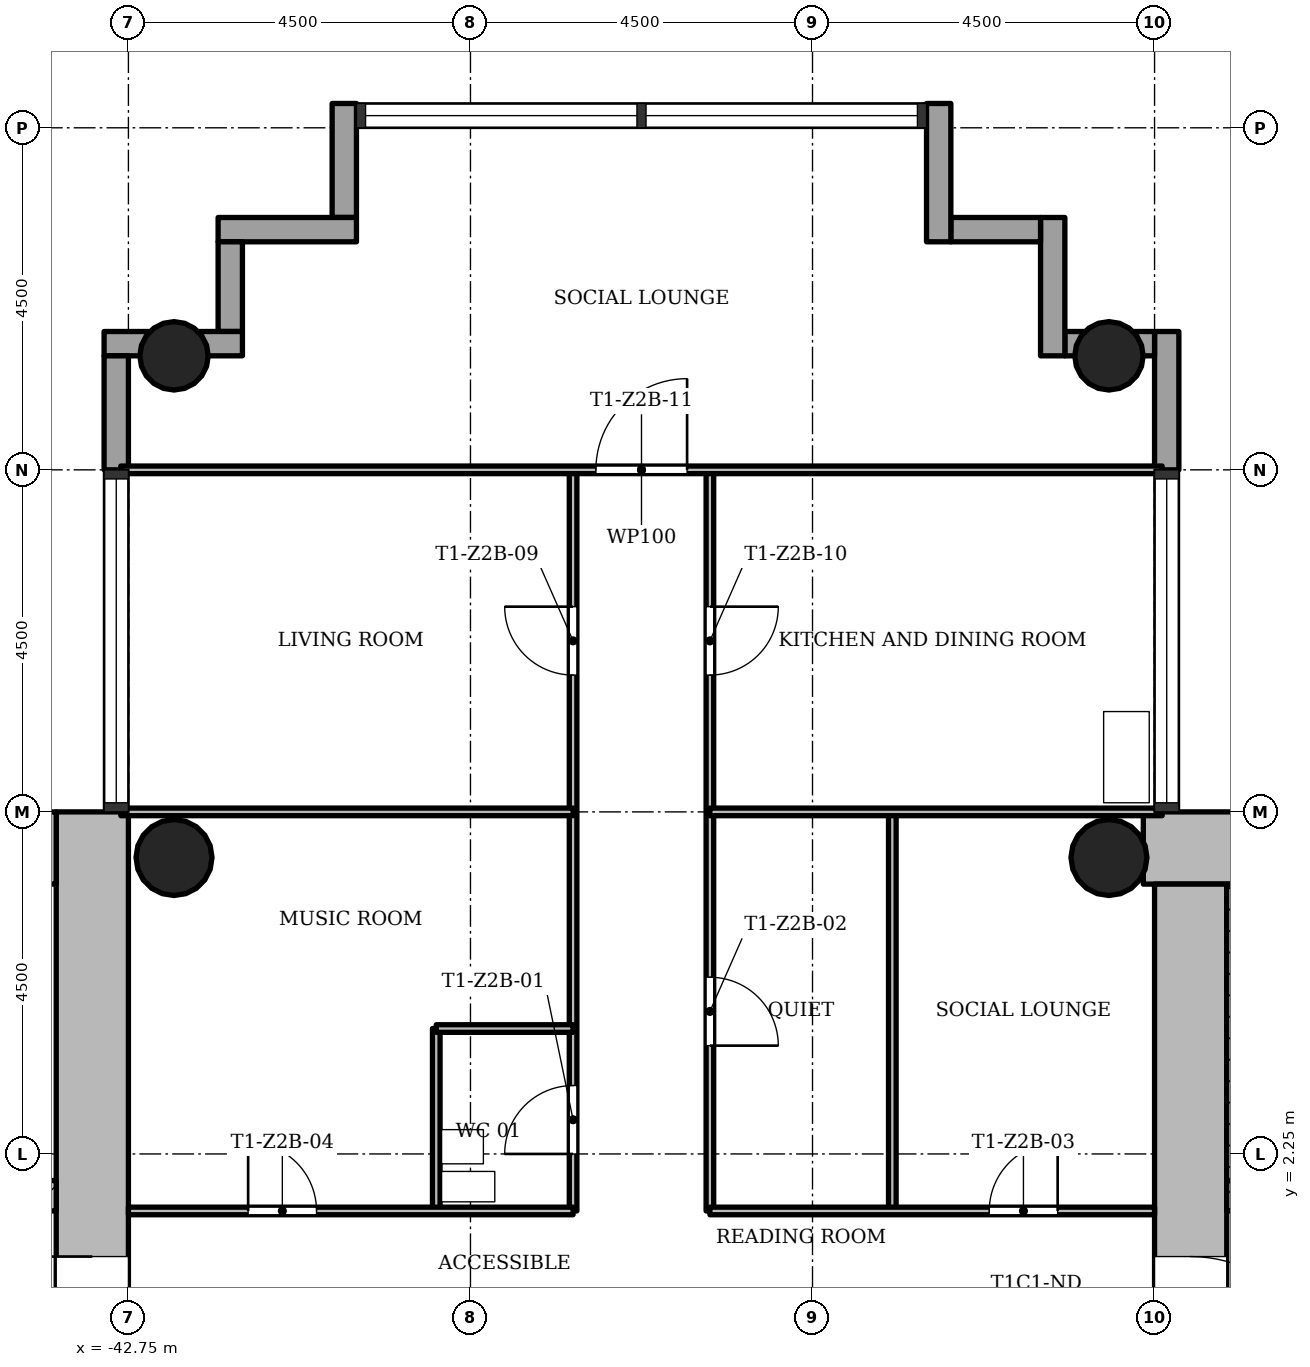
"""IFC4 building model, lengths in metres.
Left out: names, types, materials, properties, quantities, classifications, styles, units other than length and angle.
Written with IfcOpenShell. Run it as: python <this file> out.ifc"""

import sys

from ifc_helpers import new_model, si_unit, direction, frame, frame_2d, origin, origin_2d, place, context, subcontext, project, spatial, rectangle, hollow_circle, extrude, element, fill, save


model = new_model("IFC4")
c1 = context("Model", 3, precision=1e-05, world=origin(), true_north=direction((0.0, 1.0)))
c2 = subcontext(c1, "Body", "Model", "MODEL_VIEW")
j1 = project(units=[si_unit("LENGTHUNIT", "METRE"), si_unit("PLANEANGLEUNIT", "RADIAN")], contexts=[c1])
p1 = place(None, origin())
s1 = spatial("IfcSite", under=j1, at=p1, CompositionType="ELEMENT")
p2 = place(p1, origin())
s2 = spatial("IfcBuilding", under=s1, at=p2, CompositionType="ELEMENT")
p3 = place(p2, frame((0.0, 0.0, 80.0)))
s3 = spatial("IfcBuildingStorey", under=s2, at=p3, CompositionType="ELEMENT", Elevation=80.0)
p4 = place(p3, frame((-20.702, 6.275, 0.0), z_axis=(0.0, 0.0, 1.0), x_axis=(-1.0, 0.0, 0.0)))
e1 = element("IfcWall", 1, at=p4, inside=s3, PredefinedType="SHEAR", context=c2, shape_type="SweptSolid", body=[
    extrude(rectangle(XDim=8.696, YDim=0.95, at=frame_2d((4.348, 0.0))), origin(), (0.0, 0.0, 1.0), 3.4),
])
p5 = place(p3, frame((-28.775, 5.8, 0.0), z_axis=(0.0, 0.0, 1.0), x_axis=(0.0, -1.0, 0.0)))
e2 = element("IfcWall", 2, at=p5, inside=s3, PredefinedType="SHEAR", context=c2, shape_type="SweptSolid", body=[
    extrude(rectangle(XDim=12.55, YDim=0.95, at=frame_2d((6.275, 0.0))), origin(), (0.0, 0.0, 1.0), 3.4),
])
p6 = place(p5, frame((4.9, 0.0, 0.0)))
e3 = element("IfcOpeningElement", 3, at=p6, cuts=e2, PredefinedType="OPENING", context=c2, shape_type="SweptSolid", body=[
    extrude(rectangle(XDim=1.8, YDim=2.1, at=frame_2d((0.9, 1.05))), frame((0.0, 0.485, 0.0), z_axis=(0.0, -1.0, 0.0), x_axis=(1.0, 0.0, 0.0)), (0.0, 0.0, 1.0), 0.97),
])
p7 = place(p3, frame((-28.3, 1.7, 0.0), z_axis=(0.0, 0.0, 1.0), x_axis=(1.0, 0.0, 0.0)))
e4 = element("IfcWall", 4, at=p7, inside=s3, PredefinedType="SHEAR", context=c2, shape_type="SweptSolid", body=[
    extrude(rectangle(XDim=7.1, YDim=0.4, at=frame_2d((3.55, 0.0))), origin(), (0.0, 0.0, 1.0), 3.4),
])
p8 = place(p7, frame((0.7, 0.0, 0.0)))
e5 = element("IfcOpeningElement", 5, at=p8, cuts=e4, PredefinedType="OPENING", context=c2, shape_type="SweptSolid", body=[
    extrude(rectangle(XDim=0.9, YDim=2.1, at=frame_2d((0.45, 1.05))), frame((0.0, 0.21, 0.0), z_axis=(0.0, -1.0, 0.0), x_axis=(1.0, 0.0, 0.0)), (0.0, 0.0, 1.0), 0.42),
])
p9 = place(p3, frame((-43.225, -5.8, 0.0), z_axis=(0.0, 0.0, 1.0), x_axis=(0.0, 1.0, 0.0)))
e6 = element("IfcWall", 6, at=p9, inside=s3, PredefinedType="SHEAR", context=c2, shape_type="SweptSolid", body=[
    extrude(rectangle(XDim=12.55, YDim=0.95, at=frame_2d((6.275, 0.0))), origin(), (0.0, 0.0, 1.0), 3.4),
])
p10 = place(p9, frame((4.9, 0.0, 0.0)))
e7 = element("IfcOpeningElement", 7, at=p10, cuts=e6, PredefinedType="OPENING", context=c2, shape_type="SweptSolid", body=[
    extrude(rectangle(XDim=1.8, YDim=2.1, at=frame_2d((0.9, 1.05))), frame((0.0, 0.485, 0.0), z_axis=(0.0, -1.0, 0.0), x_axis=(1.0, 0.0, 0.0)), (0.0, 0.0, 1.0), 0.97),
])
p11 = place(p3, frame((-43.7, 6.275, 0.0), z_axis=(0.0, 0.0, 1.0), x_axis=(-1.0, 0.0, 0.0)))
e8 = element("IfcWall", 8, at=p11, inside=s3, PredefinedType="SHEAR", context=c2, shape_type="SweptSolid", body=[
    extrude(rectangle(XDim=8.05, YDim=0.95, at=frame_2d((4.025, 0.0))), origin(), (0.0, 0.0, 1.0), 3.4),
])
p12 = place(p3, frame((-50.8, 1.7, 0.0), z_axis=(0.0, 0.0, 1.0), x_axis=(1.0, 0.0, 0.0)))
e9 = element("IfcWall", 9, at=p12, inside=s3, PredefinedType="SHEAR", context=c2, shape_type="SweptSolid", body=[
    extrude(rectangle(XDim=7.1, YDim=0.4, at=frame_2d((3.55, 0.0))), origin(), (0.0, 0.0, 1.0), 3.4),
])
p13 = place(p12, frame((5.2, 0.0, 0.0)))
e10 = element("IfcOpeningElement", 10, at=p13, cuts=e9, PredefinedType="OPENING", context=c2, shape_type="SweptSolid", body=[
    extrude(rectangle(XDim=1.1, YDim=2.1, at=frame_2d((0.55, 1.05))), frame((0.0, 0.21, 0.0), z_axis=(0.0, -1.0, 0.0), x_axis=(1.0, 0.0, 0.0)), (0.0, 0.0, 1.0), 0.42),
])
for number, where, z_axis, x_axis in (
    (11, (-29.85, 12.75, 0.0), (0.0, 0.0, 1.0), (1.0, 0.0, 0.0)),
    (12, (-42.15, 12.75, 0.0), (0.0, 0.0, 1.0), (1.0, 0.0, 0.0)),
):
    element("IfcColumn", number, at=place(p3, frame(where, z_axis=z_axis, x_axis=x_axis)), inside=s3, PredefinedType="COLUMN", context=c2, shape_type="SweptSolid", body=[
        extrude(hollow_circle(Radius=0.45, WallThickness=0.032, at=origin_2d()), origin(), (0.0, 0.0, 1.0), 3.4),
    ])
for number, where, z_axis, x_axis in (
    (13, (-29.85, 6.15, 0.0), (0.0, 0.0, 1.0), (1.0, 0.0, 0.0)),
    (14, (-42.15, 6.15, 0.0), (0.0, 0.0, 1.0), (1.0, 0.0, 0.0)),
):
    element("IfcColumn", number, at=place(p3, frame(where, z_axis=z_axis, x_axis=x_axis)), inside=s3, PredefinedType="COLUMN", context=c2, shape_type="SweptSolid", body=[
        extrude(hollow_circle(Radius=0.5, WallThickness=0.036, at=origin_2d()), origin(), (0.0, 0.0, 1.0), 3.4),
    ])
p14 = place(p3, frame((-29.09, 11.25, -0.3), z_axis=(0.0, 0.0, 1.0), x_axis=(0.0, 1.0, 0.0)))
e15 = element("IfcWall", 15, at=p14, inside=s3, PredefinedType="STANDARD", context=c2, shape_type="SweptSolid", body=[
    extrude(rectangle(XDim=1.82, YDim=0.32, at=frame_2d((0.91, 0.0))), origin(), (0.0, 0.0, 1.0), 3.4),
])
p15 = place(p3, frame((-29.25, 12.91, -0.3), z_axis=(0.0, 0.0, 1.0), x_axis=(-1.0, 0.0, 0.0)))
e16 = element("IfcWall", 16, at=p15, inside=s3, PredefinedType="STANDARD", context=c2, shape_type="SweptSolid", body=[
    extrude(rectangle(XDim=1.18, YDim=0.32, at=frame_2d((0.59, 0.0))), origin(), (0.0, 0.0, 1.0), 3.4),
])
p16 = place(p3, frame((-30.59, 12.75, -0.3), z_axis=(0.0, 0.0, 1.0), x_axis=(0.0, 1.0, 0.0)))
e17 = element("IfcWall", 17, at=p16, inside=s3, PredefinedType="STANDARD", context=c2, shape_type="SweptSolid", body=[
    extrude(rectangle(XDim=1.82, YDim=0.32, at=frame_2d((0.91, 0.0))), origin(), (0.0, 0.0, 1.0), 3.4),
])
p17 = place(p3, frame((-30.75, 14.41, -0.3), z_axis=(0.0, 0.0, 1.0), x_axis=(-1.0, 0.0, 0.0)))
e18 = element("IfcWall", 18, at=p17, inside=s3, PredefinedType="STANDARD", context=c2, shape_type="SweptSolid", body=[
    extrude(rectangle(XDim=1.18, YDim=0.32, at=frame_2d((0.59, 0.0))), origin(), (0.0, 0.0, 1.0), 3.4),
])
p18 = place(p3, frame((-32.09, 14.25, -0.3), z_axis=(0.0, 0.0, 1.0), x_axis=(0.0, 1.0, 0.0)))
e19 = element("IfcWall", 19, at=p18, inside=s3, PredefinedType="STANDARD", context=c2, shape_type="SweptSolid", body=[
    extrude(rectangle(XDim=1.82, YDim=0.32, at=frame_2d((0.91, 0.0))), origin(), (0.0, 0.0, 1.0), 3.4),
])
p19 = place(p3, frame((-39.91, 16.07, -0.3), z_axis=(0.0, 0.0, 1.0), x_axis=(0.0, -1.0, 0.0)))
e20 = element("IfcWall", 20, at=p19, inside=s3, PredefinedType="STANDARD", context=c2, shape_type="SweptSolid", body=[
    extrude(rectangle(XDim=1.5, YDim=0.32, at=frame_2d((0.75, 0.0))), origin(), (0.0, 0.0, 1.0), 3.4),
])
p20 = place(p3, frame((-39.75, 14.41, -0.3), z_axis=(0.0, 0.0, 1.0), x_axis=(-1.0, 0.0, 0.0)))
e21 = element("IfcWall", 21, at=p20, inside=s3, PredefinedType="STANDARD", context=c2, shape_type="SweptSolid", body=[
    extrude(rectangle(XDim=1.82, YDim=0.32, at=frame_2d((0.91, 0.0))), origin(), (0.0, 0.0, 1.0), 3.4),
])
p21 = place(p3, frame((-41.41, 14.25, -0.3), z_axis=(0.0, 0.0, 1.0), x_axis=(0.0, -1.0, 0.0)))
e22 = element("IfcWall", 22, at=p21, inside=s3, PredefinedType="STANDARD", context=c2, shape_type="SweptSolid", body=[
    extrude(rectangle(XDim=1.18, YDim=0.32, at=frame_2d((0.59, 0.0))), origin(), (0.0, 0.0, 1.0), 3.4),
])
p22 = place(p3, frame((-41.25, 12.91, -0.3), z_axis=(0.0, 0.0, 1.0), x_axis=(-1.0, 0.0, 0.0)))
e23 = element("IfcWall", 23, at=p22, inside=s3, PredefinedType="STANDARD", context=c2, shape_type="SweptSolid", body=[
    extrude(rectangle(XDim=1.82, YDim=0.32, at=frame_2d((0.91, 0.0))), origin(), (0.0, 0.0, 1.0), 3.4),
])
p23 = place(p3, frame((-42.91, 12.75, -0.3), z_axis=(0.0, 0.0, 1.0), x_axis=(0.0, -1.0, 0.0)))
e24 = element("IfcWall", 24, at=p23, inside=s3, PredefinedType="STANDARD", context=c2, shape_type="SweptSolid", body=[
    extrude(rectangle(XDim=1.5, YDim=0.32, at=frame_2d((0.75, 0.0))), origin(), (0.0, 0.0, 1.0), 3.4),
])
p24 = place(p3, frame((-38.7, 1.5, 0.0), z_axis=(0.0, 0.0, 1.0), x_axis=(0.0, 1.0, 0.0)))
e25 = element("IfcWall", 25, at=p24, inside=s3, PredefinedType="PARTITIONING", context=c2, shape_type="SweptSolid", body=[
    extrude(rectangle(XDim=2.4, YDim=0.1, at=frame_2d((1.2, 0.0))), origin(), (0.0, 0.0, 1.0), 3.0),
])
p25 = place(p3, frame((-36.9, 1.5, 0.0), z_axis=(0.0, 0.0, 1.0), x_axis=(0.0, 1.0, 0.0)))
e26 = element("IfcWall", 26, at=p25, inside=s3, PredefinedType="PARTITIONING", context=c2, shape_type="SweptSolid", body=[
    extrude(rectangle(XDim=9.75, YDim=0.1, at=frame_2d((4.875, 0.0))), origin(), (0.0, 0.0, 1.0), 3.0),
])
p26 = place(p25, frame((0.75, 0.0, 0.0)))
e27 = element("IfcOpeningElement", 27, at=p26, cuts=e26, PredefinedType="OPENING", context=c2, shape_type="SweptSolid", body=[
    extrude(rectangle(XDim=0.9, YDim=2.1, at=frame_2d((0.45, 1.05))), frame((0.0, 0.06, 0.0), z_axis=(0.0, -1.0, 0.0), x_axis=(1.0, 0.0, 0.0)), (0.0, 0.0, 1.0), 0.12),
])
p27 = place(p25, frame((7.05, 0.0, 0.0)))
e28 = element("IfcOpeningElement", 28, at=p27, cuts=e26, PredefinedType="OPENING", context=c2, shape_type="SweptSolid", body=[
    extrude(rectangle(XDim=0.9, YDim=2.1, at=frame_2d((0.45, 1.05))), frame((0.0, 0.06, 0.0), z_axis=(0.0, -1.0, 0.0), x_axis=(1.0, 0.0, 0.0)), (0.0, 0.0, 1.0), 0.12),
])
p28 = place(p3, frame((-35.1, 1.5, 0.0), z_axis=(0.0, 0.0, 1.0), x_axis=(0.0, 1.0, 0.0)))
e29 = element("IfcWall", 29, at=p28, inside=s3, PredefinedType="PARTITIONING", context=c2, shape_type="SweptSolid", body=[
    extrude(rectangle(XDim=9.75, YDim=0.1, at=frame_2d((4.875, 0.0))), origin(), (0.0, 0.0, 1.0), 3.0),
])
p29 = place(p28, frame((2.175, 0.0, 0.0)))
e30 = element("IfcOpeningElement", 30, at=p29, cuts=e29, PredefinedType="OPENING", context=c2, shape_type="SweptSolid", body=[
    extrude(rectangle(XDim=0.9, YDim=2.1, at=frame_2d((0.45, 1.05))), frame((0.0, 0.06, 0.0), z_axis=(0.0, -1.0, 0.0), x_axis=(1.0, 0.0, 0.0)), (0.0, 0.0, 1.0), 0.12),
])
p30 = place(p28, frame((7.05, 0.0, 0.0)))
e31 = element("IfcOpeningElement", 31, at=p30, cuts=e29, PredefinedType="OPENING", context=c2, shape_type="SweptSolid", body=[
    extrude(rectangle(XDim=0.9, YDim=2.1, at=frame_2d((0.45, 1.05))), frame((0.0, 0.06, 0.0), z_axis=(0.0, -1.0, 0.0), x_axis=(1.0, 0.0, 0.0)), (0.0, 0.0, 1.0), 0.12),
])
p31 = place(p3, frame((-32.7, 1.5, 0.0), z_axis=(0.0, 0.0, 1.0), x_axis=(0.0, 1.0, 0.0)))
e32 = element("IfcWall", 32, at=p31, inside=s3, PredefinedType="PARTITIONING", context=c2, shape_type="SweptSolid", body=[
    extrude(rectangle(XDim=5.25, YDim=0.1, at=frame_2d((2.625, 0.0))), origin(), (0.0, 0.0, 1.0), 3.0),
])
p32 = place(p3, frame((-42.75, 1.5, 0.0), z_axis=(0.0, 0.0, 1.0), x_axis=(1.0, 0.0, 0.0)))
e33 = element("IfcWall", 33, at=p32, inside=s3, PredefinedType="PARTITIONING", context=c2, shape_type="SweptSolid", body=[
    extrude(rectangle(XDim=5.85, YDim=0.1, at=frame_2d((2.925, 0.0))), origin(), (0.0, 0.0, 1.0), 3.0),
])
p33 = place(p32, frame((1.575, 0.0, 0.0)))
e34 = element("IfcOpeningElement", 34, at=p33, cuts=e33, PredefinedType="OPENING", context=c2, shape_type="SweptSolid", body=[
    extrude(rectangle(XDim=0.9, YDim=2.1, at=frame_2d((0.45, 1.05))), frame((0.0, 0.06, 0.0), z_axis=(0.0, -1.0, 0.0), x_axis=(1.0, 0.0, 0.0)), (0.0, 0.0, 1.0), 0.12),
])
p34 = place(p3, frame((-35.1, 1.5, 0.0), z_axis=(0.0, 0.0, 1.0), x_axis=(1.0, 0.0, 0.0)))
e35 = element("IfcWall", 35, at=p34, inside=s3, PredefinedType="PARTITIONING", context=c2, shape_type="SweptSolid", body=[
    extrude(rectangle(XDim=5.85, YDim=0.1, at=frame_2d((2.925, 0.0))), origin(), (0.0, 0.0, 1.0), 3.0),
])
p35 = place(p34, frame((3.675, 0.0, 0.0)))
e36 = element("IfcOpeningElement", 36, at=p35, cuts=e35, PredefinedType="OPENING", context=c2, shape_type="SweptSolid", body=[
    extrude(rectangle(XDim=0.9, YDim=2.1, at=frame_2d((0.45, 1.05))), frame((0.0, 0.06, 0.0), z_axis=(0.0, -1.0, 0.0), x_axis=(1.0, 0.0, 0.0)), (0.0, 0.0, 1.0), 0.12),
])
p36 = place(p3, frame((-38.7, 3.9, 0.0), z_axis=(0.0, 0.0, 1.0), x_axis=(1.0, 0.0, 0.0)))
e37 = element("IfcWall", 37, at=p36, inside=s3, PredefinedType="PARTITIONING", context=c2, shape_type="SweptSolid", body=[
    extrude(rectangle(XDim=1.8, YDim=0.1, at=frame_2d((0.9, 0.0))), origin(), (0.0, 0.0, 1.0), 3.0),
])
for number, where, z_axis, x_axis in (
    (38, (-42.85, 6.75, 0.0), (0.0, 0.0, 1.0), (1.0, 0.0, 0.0)),
    (39, (-35.1, 6.75, 0.0), (0.0, 0.0, 1.0), (1.0, 0.0, 0.0)),
):
    element("IfcWall", number, at=place(p3, frame(where, z_axis=z_axis, x_axis=x_axis)), inside=s3, PredefinedType="PARTITIONING", context=c2, shape_type="SweptSolid", body=[
        extrude(rectangle(XDim=5.95, YDim=0.1, at=frame_2d((2.975, 0.0))), origin(), (0.0, 0.0, 1.0), 3.0),
    ])
p37 = place(p3, frame((-42.85, 11.25, 0.0), z_axis=(0.0, 0.0, 1.0), x_axis=(1.0, 0.0, 0.0)))
e40 = element("IfcWall", 40, at=p37, inside=s3, PredefinedType="PARTITIONING", context=c2, shape_type="SweptSolid", body=[
    extrude(rectangle(XDim=13.7, YDim=0.1, at=frame_2d((6.85, 0.0))), origin(), (0.0, 0.0, 1.0), 3.0),
])
p38 = place(p37, frame((6.25, 0.0, 0.0)))
e41 = element("IfcOpeningElement", 41, at=p38, cuts=e40, PredefinedType="OPENING", context=c2, shape_type="SweptSolid", body=[
    extrude(rectangle(XDim=1.2, YDim=2.1, at=frame_2d((0.6, 1.05))), frame((0.0, 0.06, 0.0), z_axis=(0.0, -1.0, 0.0), x_axis=(1.0, 0.0, 0.0)), (0.0, 0.0, 1.0), 0.12),
])
p39 = place(p3, frame((-28.175, 1.9, 0.0), z_axis=(0.0, 0.0, 1.0), x_axis=(0.0, 1.0, 0.0)))
e42 = element("IfcWall", 42, at=p39, inside=s3, PredefinedType="SHEAR", context=c2, shape_type="SweptSolid", body=[
    extrude(rectangle(XDim=3.9, YDim=0.25, at=frame_2d((1.95, 0.0))), origin(), (0.0, 0.0, 1.0), 3.4),
])
p40 = place(p26, origin())
e43 = element("IfcDoor", 43, at=p40, inside=s3, OperationType="SINGLE_SWING_RIGHT", PredefinedType="DOOR", context=c2, shape_type="SweptSolid", body=[
    extrude(rectangle(XDim=0.9, YDim=2.1, at=frame_2d((0.45, 1.05))), frame((0.0, 0.025, 0.0), z_axis=(0.0, -1.0, 0.0), x_axis=(1.0, 0.0, 0.0)), (0.0, 0.0, 1.0), 0.05),
])
fill(e27, e43)
p41 = place(p29, origin())
e44 = element("IfcDoor", 44, at=p41, inside=s3, OperationType="SINGLE_SWING_LEFT", PredefinedType="DOOR", context=c2, shape_type="SweptSolid", body=[
    extrude(rectangle(XDim=0.9, YDim=2.1, at=frame_2d((0.45, 1.05))), frame((0.0, 0.025, 0.0), z_axis=(0.0, -1.0, 0.0), x_axis=(1.0, 0.0, 0.0)), (0.0, 0.0, 1.0), 0.05),
])
fill(e30, e44)
p42 = place(p35, origin())
e45 = element("IfcDoor", 45, at=p42, inside=s3, OperationType="SINGLE_SWING_LEFT", PredefinedType="DOOR", context=c2, shape_type="SweptSolid", body=[
    extrude(rectangle(XDim=0.9, YDim=2.1, at=frame_2d((0.45, 1.05))), frame((0.0, 0.025, 0.0), z_axis=(0.0, -1.0, 0.0), x_axis=(1.0, 0.0, 0.0)), (0.0, 0.0, 1.0), 0.05),
])
fill(e36, e45)
p43 = place(p33, origin())
e46 = element("IfcDoor", 46, at=p43, inside=s3, OperationType="SINGLE_SWING_RIGHT", PredefinedType="DOOR", context=c2, shape_type="SweptSolid", body=[
    extrude(rectangle(XDim=0.9, YDim=2.1, at=frame_2d((0.45, 1.05))), frame((0.0, 0.025, 0.0), z_axis=(0.0, -1.0, 0.0), x_axis=(1.0, 0.0, 0.0)), (0.0, 0.0, 1.0), 0.05),
])
fill(e34, e46)
p44 = place(p27, origin())
e47 = element("IfcDoor", 47, at=p44, inside=s3, OperationType="SINGLE_SWING_LEFT", PredefinedType="DOOR", context=c2, shape_type="SweptSolid", body=[
    extrude(rectangle(XDim=0.9, YDim=2.1, at=frame_2d((0.45, 1.05))), frame((0.0, 0.025, 0.0), z_axis=(0.0, -1.0, 0.0), x_axis=(1.0, 0.0, 0.0)), (0.0, 0.0, 1.0), 0.05),
])
fill(e28, e47)
p45 = place(p30, origin())
e48 = element("IfcDoor", 48, at=p45, inside=s3, OperationType="SINGLE_SWING_RIGHT", PredefinedType="DOOR", context=c2, shape_type="SweptSolid", body=[
    extrude(rectangle(XDim=0.9, YDim=2.1, at=frame_2d((0.45, 1.05))), frame((0.0, 0.025, 0.0), z_axis=(0.0, -1.0, 0.0), x_axis=(1.0, 0.0, 0.0)), (0.0, 0.0, 1.0), 0.05),
])
fill(e31, e48)
p46 = place(p38, origin())
e49 = element("IfcDoor", 49, at=p46, inside=s3, OperationType="SINGLE_SWING_LEFT", PredefinedType="DOOR", context=c2, shape_type="SweptSolid", body=[
    extrude(rectangle(XDim=1.2, YDim=2.1, at=frame_2d((0.6, 1.05))), frame((0.0, 0.025, 0.0), z_axis=(0.0, -1.0, 0.0), x_axis=(1.0, 0.0, 0.0)), (0.0, 0.0, 1.0), 0.05),
])
fill(e41, e49)
p47 = place(p6, origin())
e50 = element("IfcDoor", 50, at=p47, inside=s3, OperationType="SINGLE_SWING_LEFT", PredefinedType="DOOR", context=c2, shape_type="SweptSolid", body=[
    extrude(rectangle(XDim=1.8, YDim=2.1, at=frame_2d((0.9, 1.05))), frame((0.0, 0.025, 0.0), z_axis=(0.0, -1.0, 0.0), x_axis=(1.0, 0.0, 0.0)), (0.0, 0.0, 1.0), 0.05),
])
fill(e3, e50)
p48 = place(p10, origin())
e51 = element("IfcDoor", 51, at=p48, inside=s3, OperationType="SINGLE_SWING_LEFT", PredefinedType="DOOR", context=c2, shape_type="SweptSolid", body=[
    extrude(rectangle(XDim=1.8, YDim=2.1, at=frame_2d((0.9, 1.05))), frame((0.0, 0.025, 0.0), z_axis=(0.0, -1.0, 0.0), x_axis=(1.0, 0.0, 0.0)), (0.0, 0.0, 1.0), 0.05),
])
fill(e7, e51)
save(model, sys.argv[1])
